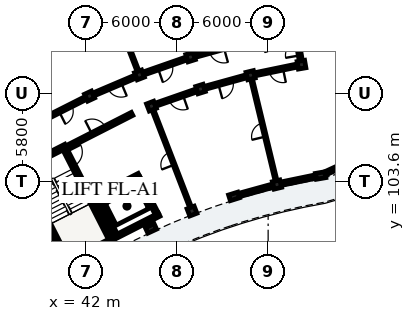
"""IFC4 building model, lengths in metres.
Left out: names, types, materials, properties, quantities, classifications, styles, units other than length and angle.
Written with IfcOpenShell. Run it as: python <this file> out.ifc"""

import sys

from ifc_helpers import new_model, si_unit, direction, frame, frame_2d, origin, origin_2d, place, context, subcontext, project, spatial, rectangle, extrude, element, fill, save


model = new_model("IFC4")
c1 = context("Model", 3, precision=1e-05, world=origin(), true_north=direction((0.0, 1.0)))
c2 = subcontext(c1, "Body", "Model", "MODEL_VIEW")
j1 = project(units=[si_unit("LENGTHUNIT", "METRE"), si_unit("PLANEANGLEUNIT", "RADIAN")], contexts=[c1])
p1 = place(None, origin())
s1 = spatial("IfcSite", under=j1, at=p1, CompositionType="ELEMENT")
p2 = place(p1, origin())
s2 = spatial("IfcBuilding", under=s1, at=p2, CompositionType="ELEMENT")
p3 = place(p2, frame((0.0, 0.0, 35.72)))
s3 = spatial("IfcBuildingStorey", under=s2, at=p3, CompositionType="ELEMENT", Elevation=35.72)
p4 = place(p3, frame((37.773, 104.296, 0.0), z_axis=(0.0, 0.0, 1.0), x_axis=(0.453992276384, -0.891005618941, 0.0)))
e1 = element("IfcWall", 1, at=p4, inside=s3, PredefinedType="SHEAR", context=c2, shape_type="SweptSolid", body=[
    extrude(rectangle(XDim=6.6, YDim=0.28, at=frame_2d((3.3, 0.0))), origin(), (0.0, 0.0, 1.0), 3.11),
])
for number, where, z_axis, x_axis in (
    (2, (40.709, 98.227, 0.0), (0.0, 0.0, 1.0), (0.891, 0.454, 0.0)),
    (3, (37.585, 104.357, 0.0), (0.0, 0.0, 1.0), (0.891, 0.454, 0.0)),
):
    element("IfcWall", number, at=place(p3, frame(where, z_axis=z_axis, x_axis=x_axis)), inside=s3, PredefinedType="SHEAR", context=c2, shape_type="SweptSolid", body=[
        extrude(rectangle(XDim=3.48, YDim=0.28, at=frame_2d((1.74, 0.0))), origin(), (0.0, 0.0, 1.0), 3.11),
    ])
p5 = place(p3, frame((40.625, 105.748, 0.0), z_axis=(0.0, 0.0, 1.0), x_axis=(0.453992276384, -0.891005618941, 0.0)))
e4 = element("IfcWall", 4, at=p5, inside=s3, PredefinedType="SHEAR", context=c2, shape_type="SweptSolid", body=[
    extrude(rectangle(XDim=6.6, YDim=0.28, at=frame_2d((3.3, 0.0))), origin(), (0.0, 0.0, 1.0), 3.11),
])
p6 = place(p5, frame((0.22, 0.0, 0.0)))
e5 = element("IfcOpeningElement", 5, at=p6, cuts=e4, PredefinedType="OPENING", context=c2, shape_type="SweptSolid", body=[
    extrude(rectangle(XDim=1.05, YDim=2.15, at=frame_2d((0.525, 1.075))), frame((0.0, 0.15, 0.0), z_axis=(0.0, -1.0, 0.0), x_axis=(1.0, 0.0, 0.0)), (0.0, 0.0, 1.0), 0.3),
])
p7 = place(p3, frame((42.597, 102.561, 0.0), z_axis=(0.0, 0.0, 1.0), x_axis=(0.891001200497, 0.454000947921, 0.0)))
e6 = element("IfcWall", 6, at=p7, inside=s3, PredefinedType="SHEAR", context=c2, shape_type="SweptSolid", body=[
    extrude(rectangle(XDim=3.26, YDim=0.23, at=frame_2d((1.63, 0.0))), origin(), (0.0, 0.0, 1.0), 3.11),
])
p8 = place(p7, frame((0.9, 0.0, 0.0)))
e7 = element("IfcOpeningElement", 7, at=p8, cuts=e6, PredefinedType="OPENING", context=c2, shape_type="SweptSolid", body=[
    extrude(rectangle(XDim=1.1, YDim=2.15, at=frame_2d((0.55, 1.075))), frame((0.0, 0.125, 0.0), z_axis=(0.0, -1.0, 0.0), x_axis=(1.0, 0.0, 0.0)), (0.0, 0.0, 1.0), 0.25),
])
p9 = place(p3, frame((43.927, 99.95, 0.0), z_axis=(0.0, 0.0, 1.0), x_axis=(0.891016635648, 0.453970654337, 0.0)))
e8 = element("IfcWall", 8, at=p9, inside=s3, PredefinedType="SHEAR", context=c2, shape_type="SweptSolid", body=[
    extrude(rectangle(XDim=3.26, YDim=0.23, at=frame_2d((1.63, 0.0))), origin(), (0.0, 0.0, 1.0), 3.11),
])
for number, where, z_axis, x_axis in (
    (9, (42.751, 102.511, 0.0), (0.0, 0.0, 1.0), (0.454, -0.891, 0.0)),
    (10, (45.451, 103.886, 0.0), (0.0, 0.0, 1.0), (0.454, -0.891, 0.0)),
):
    element("IfcWall", number, at=place(p3, frame(where, z_axis=z_axis, x_axis=x_axis)), inside=s3, PredefinedType="SHEAR", context=c2, shape_type="SweptSolid", body=[
        extrude(rectangle(XDim=2.7, YDim=0.23, at=frame_2d((1.35, 0.0))), origin(), (0.0, 0.0, 1.0), 3.11),
    ])
p10 = place(p3, frame((57.451, 104.004, 0.0), z_axis=(0.0, 0.0, 1.0), x_axis=(-0.169827298811, 0.985473839622, 0.0)))
e11 = element("IfcColumn", 11, at=p10, inside=s3, PredefinedType="PILASTER", context=c2, shape_type="SweptSolid", body=[
    extrude(rectangle(XDim=0.39, YDim=0.63, at=origin_2d()), origin(), (0.0, 0.0, 1.0), 3.115),
])
for number, where, z_axis, x_axis in (
    (12, (56.194, 111.297, 0.0), (0.0, 0.0, 1.0), (-0.17, 0.985, 0.0)),
    (13, (54.582, 103.412, 0.0), (0.0, 0.0, 1.0), (-0.234, 0.972, 0.0)),
    (14, (52.847, 110.606, 0.0), (0.0, 0.0, 1.0), (-0.234, 0.972, 0.0)),
):
    element("IfcColumn", number, at=place(p3, frame(where, z_axis=z_axis, x_axis=x_axis)), inside=s3, PredefinedType="COLUMN", context=c2, shape_type="SweptSolid", body=[
        extrude(rectangle(XDim=0.5, YDim=0.5, at=origin_2d()), origin(), (0.0, 0.0, 1.0), 3.115),
    ])
p11 = place(p3, frame((51.757, 102.631, 0.0), z_axis=(0.0, 0.0, 1.0), x_axis=(-0.297930292146, 0.954587628781, 0.0)))
e15 = element("IfcColumn", 15, at=p11, inside=s3, PredefinedType="PILASTER", context=c2, shape_type="SweptSolid", body=[
    extrude(rectangle(XDim=0.39, YDim=0.63, at=origin_2d()), origin(), (0.0, 0.0, 1.0), 3.115),
])
for number, where, z_axis, x_axis in (
    (16, (49.552, 109.695, 0.0), (0.0, 0.0, 1.0), (-0.298, 0.955, 0.0)),
    (17, (48.897, 111.795, 0.0), (0.0, 0.0, 1.0), (-0.298, 0.955, 0.0)),
    (18, (48.99, 101.667, 0.0), (0.0, 0.0, 1.0), (-0.36, 0.933, 0.0)),
    (19, (46.325, 108.57, 0.0), (0.0, 0.0, 1.0), (-0.36, 0.933, 0.0)),
    (20, (45.532, 110.622, 0.0), (0.0, 0.0, 1.0), (-0.36, 0.933, 0.0)),
):
    element("IfcColumn", number, at=place(p3, frame(where, z_axis=z_axis, x_axis=x_axis)), inside=s3, PredefinedType="COLUMN", context=c2, shape_type="SweptSolid", body=[
        extrude(rectangle(XDim=0.5, YDim=0.5, at=origin_2d()), origin(), (0.0, 0.0, 1.0), 3.115),
    ])
p12 = place(p3, frame((46.293, 100.522, 0.0), z_axis=(0.0, 0.0, 1.0), x_axis=(-0.420859924104, 0.907125638643, 0.0)))
e21 = element("IfcColumn", 21, at=p12, inside=s3, PredefinedType="PILASTER", context=c2, shape_type="SweptSolid", body=[
    extrude(rectangle(XDim=0.39, YDim=0.63, at=origin_2d()), origin(), (0.0, 0.0, 1.0), 3.115),
])
p13 = place(p3, frame((42.252, 109.23, 0.0), z_axis=(0.0, 0.0, 1.0), x_axis=(-0.420859924104, 0.907125638643, 0.0)))
e22 = element("IfcColumn", 22, at=p13, inside=s3, PredefinedType="COLUMN", context=c2, shape_type="SweptSolid", body=[
    extrude(rectangle(XDim=0.5, YDim=0.5, at=origin_2d()), origin(), (0.0, 0.0, 1.0), 3.115),
])
p14 = place(p3, frame((57.29, 103.971, 0.0), z_axis=(0.0, 0.0, 1.0), x_axis=(-0.979344333802, -0.20219959409, 0.0)))
e23 = element("IfcWall", 23, at=p14, inside=s3, PredefinedType="SOLIDWALL", context=c2, shape_type="SweptSolid", body=[
    extrude(rectangle(XDim=2.545, YDim=0.225, at=frame_2d((1.272, 0.0))), origin(), (0.0, 0.0, 1.0), 2.355),
])
p15 = place(p14, frame((0.693, 0.0, 0.55)))
e24 = element("IfcOpeningElement", 24, at=p15, cuts=e23, PredefinedType="OPENING", context=c2, shape_type="SweptSolid", body=[
    extrude(rectangle(XDim=1.16, YDim=1.485, at=frame_2d((0.58, 0.743))), frame((0.0, 0.123, 0.0), z_axis=(0.0, -1.0, 0.0), x_axis=(1.0, 0.0, 0.0)), (0.0, 0.0, 1.0), 0.245),
])
p16 = place(p3, frame((54.369, 103.353, 0.0), z_axis=(0.0, 0.0, 1.0), x_axis=(-0.963872968618, -0.26636234788, 0.0)))
e25 = element("IfcWall", 25, at=p16, inside=s3, PredefinedType="SOLIDWALL", context=c2, shape_type="SweptSolid", body=[
    extrude(rectangle(XDim=2.545, YDim=0.225, at=frame_2d((1.273, 0.0))), origin(), (0.0, 0.0, 1.0), 2.355),
])
p17 = place(p16, frame((0.633, 0.0, 0.55)))
e26 = element("IfcOpeningElement", 26, at=p17, cuts=e25, PredefinedType="OPENING", context=c2, shape_type="SweptSolid", body=[
    extrude(rectangle(XDim=1.28, YDim=1.56, at=frame_2d((0.64, 0.78))), frame((0.0, 0.123, 0.0), z_axis=(0.0, -1.0, 0.0), x_axis=(1.0, 0.0, 0.0)), (0.0, 0.0, 1.0), 0.245),
])
p18 = place(p3, frame((61.0, 105.642, 0.0), z_axis=(0.0, 0.0, 1.0), x_axis=(-0.907935614055, -0.419109676255, 0.0)))
e27 = element("IfcWall", 27, at=p18, inside=s3, PredefinedType="SOLIDWALL", context=c2, shape_type="SweptSolid", body=[
    extrude(rectangle(XDim=3.908, YDim=0.225, at=frame_2d((1.954, 0.0))), origin(), (0.0, 0.0, 1.0), 2.355),
])
p19 = place(p3, frame((40.682, 105.834, 0.0), z_axis=(0.0, 0.0, 1.0), x_axis=(0.891003372311, 0.453996685595, 0.0)))
e28 = element("IfcWall", 28, at=p19, inside=s3, PredefinedType="PARTITIONING", context=c2, shape_type="SweptSolid", body=[
    extrude(rectangle(XDim=4.9, YDim=0.22, at=frame_2d((2.45, 0.0))), origin(), (0.0, 0.0, 1.0), 2.34),
])
p20 = place(p19, frame((1.95, 0.0, 0.0)))
e29 = element("IfcOpeningElement", 29, at=p20, cuts=e28, PredefinedType="OPENING", context=c2, shape_type="SweptSolid", body=[
    extrude(rectangle(XDim=1.0, YDim=2.15, at=frame_2d((0.5, 1.075))), frame((0.0, 0.12, 0.0), z_axis=(0.0, -1.0, 0.0), x_axis=(1.0, 0.0, 0.0)), (0.0, 0.0, 1.0), 0.24),
])
p21 = place(p3, frame((55.852, 111.226, 0.0), z_axis=(0.0, 0.0, 1.0), x_axis=(-0.979349423541, -0.202174940608, 0.0)))
e30 = element("IfcWall", 30, at=p21, inside=s3, PredefinedType="PARTITIONING", context=c2, shape_type="SweptSolid", body=[
    extrude(rectangle(XDim=2.718, YDim=0.205, at=frame_2d((1.359, 0.0))), origin(), (0.0, 0.0, 1.0), 2.37),
])
p22 = place(p21, frame((0.894, 0.0, 0.0)))
e31 = element("IfcOpeningElement", 31, at=p22, cuts=e30, PredefinedType="OPENING", context=c2, shape_type="SweptSolid", body=[
    extrude(rectangle(XDim=0.93, YDim=2.12, at=frame_2d((0.465, 1.06))), frame((0.0, 0.113, 0.0), z_axis=(0.0, -1.0, 0.0), x_axis=(1.0, 0.0, 0.0)), (0.0, 0.0, 1.0), 0.225),
])
p23 = place(p3, frame((54.488, 103.801, 0.0), z_axis=(0.0, 0.0, 1.0), x_axis=(-0.234406698576, 0.972138621629, 0.0)))
e32 = element("IfcWall", 32, at=p23, inside=s3, PredefinedType="PARTITIONING", context=c2, shape_type="SweptSolid", body=[
    extrude(rectangle(XDim=6.6, YDim=0.125, at=frame_2d((3.3, 0.0))), origin(), (0.0, 0.0, 1.0), 2.37),
])
p24 = place(p23, frame((2.845, 0.0, 0.0)))
e33 = element("IfcOpeningElement", 33, at=p24, cuts=e32, PredefinedType="OPENING", context=c2, shape_type="SweptSolid", body=[
    extrude(rectangle(XDim=0.91, YDim=2.1, at=frame_2d((0.455, 1.05))), frame((0.0, 0.073, 0.0), z_axis=(0.0, -1.0, 0.0), x_axis=(1.0, 0.0, 0.0)), (0.0, 0.0, 1.0), 0.145),
])
p25 = place(p3, frame((51.994, 112.651, 0.0), z_axis=(0.0, 0.0, 1.0), x_axis=(-0.963890789093, -0.266297853356, 0.0)))
e34 = element("IfcWall", 34, at=p25, inside=s3, PredefinedType="PARTITIONING", context=c2, shape_type="SweptSolid", body=[
    extrude(rectangle(XDim=2.863, YDim=0.205, at=frame_2d((1.432, 0.0))), origin(), (0.0, 0.0, 1.0), 2.37),
])
p26 = place(p25, frame((0.937, 0.0, 0.0)))
e35 = element("IfcOpeningElement", 35, at=p26, cuts=e34, PredefinedType="OPENING", context=c2, shape_type="SweptSolid", body=[
    extrude(rectangle(XDim=0.99, YDim=2.16, at=frame_2d((0.495, 1.08))), frame((0.0, 0.113, 0.0), z_axis=(0.0, -1.0, 0.0), x_axis=(1.0, 0.0, 0.0)), (0.0, 0.0, 1.0), 0.225),
])
p27 = place(p3, frame((52.51, 110.512, 0.0), z_axis=(0.0, 0.0, 1.0), x_axis=(-0.96388375821, -0.266323301006, 0.0)))
e36 = element("IfcWall", 36, at=p27, inside=s3, PredefinedType="PARTITIONING", context=c2, shape_type="SweptSolid", body=[
    extrude(rectangle(XDim=2.718, YDim=0.205, at=frame_2d((1.359, 0.0))), origin(), (0.0, 0.0, 1.0), 2.37),
])
p28 = place(p27, frame((0.864, 0.0, 0.0)))
e37 = element("IfcOpeningElement", 37, at=p28, cuts=e36, PredefinedType="OPENING", context=c2, shape_type="SweptSolid", body=[
    extrude(rectangle(XDim=0.99, YDim=2.16, at=frame_2d((0.495, 1.08))), frame((0.0, 0.113, 0.0), z_axis=(0.0, -1.0, 0.0), x_axis=(1.0, 0.0, 0.0)), (0.0, 0.0, 1.0), 0.225),
])
p29 = place(p3, frame((48.566, 111.68, 0.0), z_axis=(0.0, 0.0, 1.0), x_axis=(-0.944253820929, -0.329218349522, 0.0)))
e38 = element("IfcWall", 38, at=p29, inside=s3, PredefinedType="PARTITIONING", context=c2, shape_type="SweptSolid", body=[
    extrude(rectangle(XDim=2.863, YDim=0.205, at=frame_2d((1.432, 0.0))), origin(), (0.0, 0.0, 1.0), 2.37),
])
p30 = place(p29, frame((0.947, 0.0, 0.0)))
e39 = element("IfcOpeningElement", 39, at=p30, cuts=e38, PredefinedType="OPENING", context=c2, shape_type="SweptSolid", body=[
    extrude(rectangle(XDim=0.97, YDim=2.15, at=frame_2d((0.485, 1.075))), frame((0.0, 0.113, 0.0), z_axis=(0.0, -1.0, 0.0), x_axis=(1.0, 0.0, 0.0)), (0.0, 0.0, 1.0), 0.225),
])
p31 = place(p3, frame((49.222, 109.58, 0.0), z_axis=(0.0, 0.0, 1.0), x_axis=(-0.944265123647, -0.329185929627, 0.0)))
e40 = element("IfcWall", 40, at=p31, inside=s3, PredefinedType="PARTITIONING", context=c2, shape_type="SweptSolid", body=[
    extrude(rectangle(XDim=2.718, YDim=0.205, at=frame_2d((1.359, 0.0))), origin(), (0.0, 0.0, 1.0), 2.37),
])
p32 = place(p31, frame((0.874, 0.0, 0.0)))
e41 = element("IfcOpeningElement", 41, at=p32, cuts=e40, PredefinedType="OPENING", context=c2, shape_type="SweptSolid", body=[
    extrude(rectangle(XDim=0.97, YDim=2.15, at=frame_2d((0.485, 1.075))), frame((0.0, 0.113, 0.0), z_axis=(0.0, -1.0, 0.0), x_axis=(1.0, 0.0, 0.0)), (0.0, 0.0, 1.0), 0.225),
])
p33 = place(p3, frame((45.388, 110.996, 0.0), z_axis=(0.0, 0.0, 1.0), x_axis=(-0.360186633854, 0.932880264982, 0.0)))
e42 = element("IfcWall", 42, at=p33, inside=s3, PredefinedType="PARTITIONING", context=c2, shape_type="SweptSolid", body=[
    extrude(rectangle(XDim=4.7, YDim=0.125, at=frame_2d((2.35, 0.0))), origin(), (0.0, 0.0, 1.0), 2.37),
])
p34 = place(p33, frame((1.905, 0.0, 0.0)))
e43 = element("IfcOpeningElement", 43, at=p34, cuts=e42, PredefinedType="OPENING", context=c2, shape_type="SweptSolid", body=[
    extrude(rectangle(XDim=0.89, YDim=2.1, at=frame_2d((0.445, 1.05))), frame((0.0, 0.073, 0.0), z_axis=(0.0, -1.0, 0.0), x_axis=(1.0, 0.0, 0.0)), (0.0, 0.0, 1.0), 0.145),
])
p35 = place(p3, frame((48.846, 102.04, 0.0), z_axis=(0.0, 0.0, 1.0), x_axis=(-0.360183473608, 0.932881485152, 0.0)))
e44 = element("IfcWall", 44, at=p35, inside=s3, PredefinedType="PARTITIONING", context=c2, shape_type="SweptSolid", body=[
    extrude(rectangle(XDim=6.6, YDim=0.125, at=frame_2d((3.3, 0.0))), origin(), (0.0, 0.0, 1.0), 2.37),
])
p36 = place(p35, frame((2.865, 0.0, 0.0)))
e45 = element("IfcOpeningElement", 45, at=p36, cuts=e44, PredefinedType="OPENING", context=c2, shape_type="SweptSolid", body=[
    extrude(rectangle(XDim=0.87, YDim=2.08, at=frame_2d((0.435, 1.04))), frame((0.0, 0.073, 0.0), z_axis=(0.0, -1.0, 0.0), x_axis=(1.0, 0.0, 0.0)), (0.0, 0.0, 1.0), 0.145),
])
p37 = place(p3, frame((45.21, 110.486, 0.0), z_axis=(0.0, 0.0, 1.0), x_axis=(-0.920511160294, -0.390716270168, 0.0)))
e46 = element("IfcWall", 46, at=p37, inside=s3, PredefinedType="PARTITIONING", context=c2, shape_type="SweptSolid", body=[
    extrude(rectangle(XDim=2.863, YDim=0.205, at=frame_2d((1.432, 0.0))), origin(), (0.0, 0.0, 1.0), 2.37),
])
p38 = place(p37, frame((0.957, 0.0, 0.0)))
e47 = element("IfcOpeningElement", 47, at=p38, cuts=e46, PredefinedType="OPENING", context=c2, shape_type="SweptSolid", body=[
    extrude(rectangle(XDim=0.95, YDim=2.13, at=frame_2d((0.475, 1.065))), frame((0.0, 0.113, 0.0), z_axis=(0.0, -1.0, 0.0), x_axis=(1.0, 0.0, 0.0)), (0.0, 0.0, 1.0), 0.225),
])
p39 = place(p3, frame((41.94, 109.073, 0.0), z_axis=(0.0, 0.0, 1.0), x_axis=(-0.89273239336, -0.450587254419, 0.0)))
e48 = element("IfcWall", 48, at=p39, inside=s3, PredefinedType="PARTITIONING", context=c2, shape_type="SweptSolid", body=[
    extrude(rectangle(XDim=2.863, YDim=0.205, at=frame_2d((1.432, 0.0))), origin(), (0.0, 0.0, 1.0), 2.37),
])
p40 = place(p39, frame((0.967, 0.0, 0.0)))
e49 = element("IfcOpeningElement", 49, at=p40, cuts=e48, PredefinedType="OPENING", context=c2, shape_type="SweptSolid", body=[
    extrude(rectangle(XDim=0.93, YDim=2.12, at=frame_2d((0.465, 1.06))), frame((0.0, 0.113, 0.0), z_axis=(0.0, -1.0, 0.0), x_axis=(1.0, 0.0, 0.0)), (0.0, 0.0, 1.0), 0.225),
])
p41 = place(p3, frame((56.186, 111.346, 0.0), z_axis=(0.0, 0.0, 1.0), x_axis=(-0.169864088707, 0.98546749889, 0.0)))
e50 = element("IfcWall", 50, at=p41, inside=s3, PredefinedType="PARTITIONING", context=c2, shape_type="SweptSolid", body=[
    extrude(rectangle(XDim=2.1, YDim=0.205, at=frame_2d((1.05, 0.0))), origin(), (0.0, 0.0, 1.0), 2.37),
])
p42 = place(p41, frame((0.57, 0.0, 0.0)))
e51 = element("IfcOpeningElement", 51, at=p42, cuts=e50, PredefinedType="OPENING", context=c2, shape_type="SweptSolid", body=[
    extrude(rectangle(XDim=0.95, YDim=2.13, at=frame_2d((0.475, 1.065))), frame((0.0, 0.113, 0.0), z_axis=(0.0, -1.0, 0.0), x_axis=(1.0, 0.0, 0.0)), (0.0, 0.0, 1.0), 0.225),
])
p43 = place(p15, origin())
e52 = element("IfcWindow", 52, at=p43, inside=s3, PartitioningType="SINGLE_PANEL", PredefinedType="WINDOW", context=c2, shape_type="SweptSolid", body=[
    extrude(rectangle(XDim=1.16, YDim=1.485, at=frame_2d((0.58, 0.743))), frame((0.0, 0.03, 0.0), z_axis=(0.0, -1.0, 0.0), x_axis=(1.0, 0.0, 0.0)), (0.0, 0.0, 1.0), 0.06),
])
fill(e24, e52)
p44 = place(p17, origin())
e53 = element("IfcWindow", 53, at=p44, inside=s3, PartitioningType="SINGLE_PANEL", PredefinedType="WINDOW", context=c2, shape_type="SweptSolid", body=[
    extrude(rectangle(XDim=1.28, YDim=1.56, at=frame_2d((0.64, 0.78))), frame((0.0, 0.03, 0.0), z_axis=(0.0, -1.0, 0.0), x_axis=(1.0, 0.0, 0.0)), (0.0, 0.0, 1.0), 0.06),
])
fill(e26, e53)
p45 = place(p6, origin())
e54 = element("IfcDoor", 54, at=p45, inside=s3, OperationType="SINGLE_SWING_LEFT", PredefinedType="DOOR", context=c2, shape_type="SweptSolid", body=[
    extrude(rectangle(XDim=1.05, YDim=2.15, at=frame_2d((0.525, 1.075))), frame((0.0, 0.025, 0.0), z_axis=(0.0, -1.0, 0.0), x_axis=(1.0, 0.0, 0.0)), (0.0, 0.0, 1.0), 0.05),
])
fill(e5, e54)
p46 = place(p8, origin())
e55 = element("IfcDoor", 55, at=p46, inside=s3, OperationType="DOUBLE_DOOR_SLIDING", PredefinedType="DOOR", context=c2, shape_type="SweptSolid", body=[
    extrude(rectangle(XDim=1.1, YDim=2.15, at=frame_2d((0.55, 1.075))), frame((0.0, 0.025, 0.0), z_axis=(0.0, -1.0, 0.0), x_axis=(1.0, 0.0, 0.0)), (0.0, 0.0, 1.0), 0.05),
])
fill(e7, e55)
p47 = place(p20, origin())
e56 = element("IfcDoor", 56, at=p47, inside=s3, OperationType="SINGLE_SWING_LEFT", PredefinedType="DOOR", context=c2, shape_type="SweptSolid", body=[
    extrude(rectangle(XDim=1.0, YDim=2.15, at=frame_2d((0.5, 1.075))), frame((0.0, 0.025, 0.0), z_axis=(0.0, -1.0, 0.0), x_axis=(1.0, 0.0, 0.0)), (0.0, 0.0, 1.0), 0.05),
])
fill(e29, e56)
p48 = place(p22, origin())
e57 = element("IfcDoor", 57, at=p48, inside=s3, OperationType="SINGLE_SWING_LEFT", PredefinedType="DOOR", context=c2, shape_type="SweptSolid", body=[
    extrude(rectangle(XDim=0.93, YDim=2.12, at=frame_2d((0.465, 1.06))), frame((0.0, 0.025, 0.0), z_axis=(0.0, -1.0, 0.0), x_axis=(1.0, 0.0, 0.0)), (0.0, 0.0, 1.0), 0.05),
])
fill(e31, e57)
p49 = place(p24, origin())
e58 = element("IfcDoor", 58, at=p49, inside=s3, OperationType="SINGLE_SWING_LEFT", PredefinedType="DOOR", context=c2, shape_type="SweptSolid", body=[
    extrude(rectangle(XDim=0.91, YDim=2.1, at=frame_2d((0.455, 1.05))), frame((0.0, 0.025, 0.0), z_axis=(0.0, -1.0, 0.0), x_axis=(1.0, 0.0, 0.0)), (0.0, 0.0, 1.0), 0.05),
])
fill(e33, e58)
p50 = place(p26, origin())
e59 = element("IfcDoor", 59, at=p50, inside=s3, OperationType="SINGLE_SWING_LEFT", PredefinedType="DOOR", context=c2, shape_type="SweptSolid", body=[
    extrude(rectangle(XDim=0.99, YDim=2.16, at=frame_2d((0.495, 1.08))), frame((0.0, 0.025, 0.0), z_axis=(0.0, -1.0, 0.0), x_axis=(1.0, 0.0, 0.0)), (0.0, 0.0, 1.0), 0.05),
])
fill(e35, e59)
p51 = place(p28, origin())
e60 = element("IfcDoor", 60, at=p51, inside=s3, OperationType="SINGLE_SWING_RIGHT", PredefinedType="DOOR", context=c2, shape_type="SweptSolid", body=[
    extrude(rectangle(XDim=0.99, YDim=2.16, at=frame_2d((0.495, 1.08))), frame((0.0, 0.025, 0.0), z_axis=(0.0, -1.0, 0.0), x_axis=(1.0, 0.0, 0.0)), (0.0, 0.0, 1.0), 0.05),
])
fill(e37, e60)
p52 = place(p30, origin())
e61 = element("IfcDoor", 61, at=p52, inside=s3, OperationType="SINGLE_SWING_RIGHT", PredefinedType="DOOR", context=c2, shape_type="SweptSolid", body=[
    extrude(rectangle(XDim=0.97, YDim=2.15, at=frame_2d((0.485, 1.075))), frame((0.0, 0.025, 0.0), z_axis=(0.0, -1.0, 0.0), x_axis=(1.0, 0.0, 0.0)), (0.0, 0.0, 1.0), 0.05),
])
fill(e39, e61)
p53 = place(p32, origin())
e62 = element("IfcDoor", 62, at=p53, inside=s3, OperationType="SINGLE_SWING_LEFT", PredefinedType="DOOR", context=c2, shape_type="SweptSolid", body=[
    extrude(rectangle(XDim=0.97, YDim=2.15, at=frame_2d((0.485, 1.075))), frame((0.0, 0.025, 0.0), z_axis=(0.0, -1.0, 0.0), x_axis=(1.0, 0.0, 0.0)), (0.0, 0.0, 1.0), 0.05),
])
fill(e41, e62)
p54 = place(p36, origin())
e63 = element("IfcDoor", 63, at=p54, inside=s3, OperationType="SINGLE_SWING_LEFT", PredefinedType="DOOR", context=c2, shape_type="SweptSolid", body=[
    extrude(rectangle(XDim=0.87, YDim=2.08, at=frame_2d((0.435, 1.04))), frame((0.0, 0.025, 0.0), z_axis=(0.0, -1.0, 0.0), x_axis=(1.0, 0.0, 0.0)), (0.0, 0.0, 1.0), 0.05),
])
fill(e45, e63)
p55 = place(p38, origin())
e64 = element("IfcDoor", 64, at=p55, inside=s3, OperationType="SINGLE_SWING_LEFT", PredefinedType="DOOR", context=c2, shape_type="SweptSolid", body=[
    extrude(rectangle(XDim=0.95, YDim=2.13, at=frame_2d((0.475, 1.065))), frame((0.0, 0.025, 0.0), z_axis=(0.0, -1.0, 0.0), x_axis=(1.0, 0.0, 0.0)), (0.0, 0.0, 1.0), 0.05),
])
fill(e47, e64)
p56 = place(p40, origin())
e65 = element("IfcDoor", 65, at=p56, inside=s3, OperationType="SINGLE_SWING_RIGHT", PredefinedType="DOOR", context=c2, shape_type="SweptSolid", body=[
    extrude(rectangle(XDim=0.93, YDim=2.12, at=frame_2d((0.465, 1.06))), frame((0.0, 0.025, 0.0), z_axis=(0.0, -1.0, 0.0), x_axis=(1.0, 0.0, 0.0)), (0.0, 0.0, 1.0), 0.05),
])
fill(e49, e65)
p57 = place(p42, origin())
e66 = element("IfcDoor", 66, at=p57, inside=s3, OperationType="SINGLE_SWING_LEFT", PredefinedType="DOOR", context=c2, shape_type="SweptSolid", body=[
    extrude(rectangle(XDim=0.95, YDim=2.13, at=frame_2d((0.475, 1.065))), frame((0.0, 0.025, 0.0), z_axis=(0.0, -1.0, 0.0), x_axis=(1.0, 0.0, 0.0)), (0.0, 0.0, 1.0), 0.05),
])
fill(e51, e66)
save(model, sys.argv[1])
